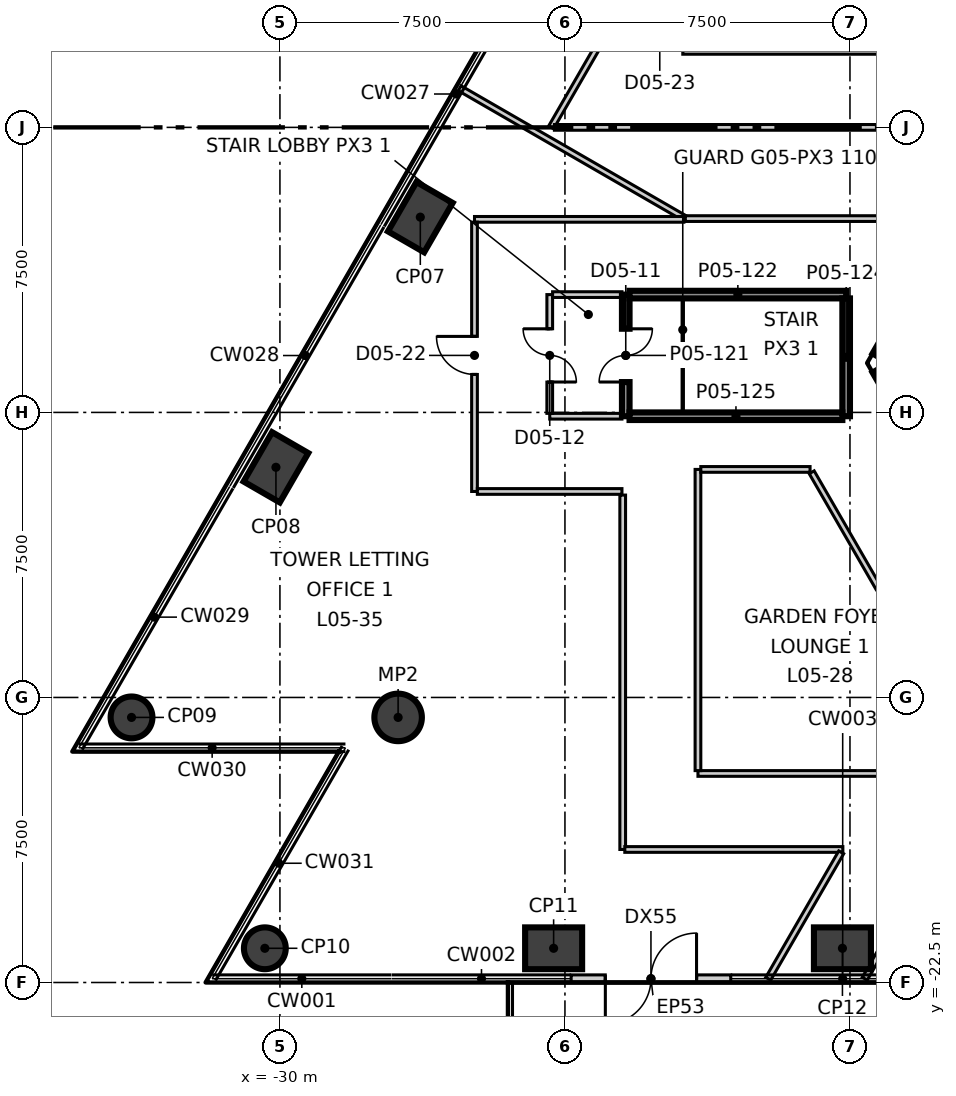
"""IFC4 building model, lengths in metres.
Left out: names, types, materials, properties, quantities, classifications, styles, units other than length and angle.
Written with IfcOpenShell. Run it as: python <this file> out.ifc"""

import sys

from ifc_helpers import new_model, si_unit, direction, frame, frame_2d, origin, origin_2d, place, context, subcontext, project, spatial, polyline, rectangle, circle, outline, extrude, element, fill, save


model = new_model("IFC4")
c1 = context("Model", 3, precision=1e-05, world=origin(), true_north=direction((0.0, 1.0)))
c2 = subcontext(c1, "Body", "Model", "MODEL_VIEW")
j1 = project(units=[si_unit("LENGTHUNIT", "METRE"), si_unit("PLANEANGLEUNIT", "RADIAN")], contexts=[c1])
p1 = place(None, origin())
s1 = spatial("IfcSite", under=j1, at=p1, CompositionType="ELEMENT")
p2 = place(p1, origin())
s2 = spatial("IfcBuilding", under=s1, at=p2, CompositionType="ELEMENT")
p3 = place(p2, frame((0.0, 0.0, 30.3)))
s3 = spatial("IfcBuildingStorey", under=s2, at=p3, CompositionType="ELEMENT", Elevation=30.3)
p4 = place(p3, frame((-1.617, 15.2, -0.4), z_axis=(0.0, 0.0, 1.0), x_axis=(-0.499992141631, -0.866029940768, 0.0)))
e1 = element("IfcWall", 1, at=p4, inside=s3, PredefinedType="SHEAR", context=c2, shape_type="SweptSolid", body=[
    extrude(outline(polyline([(-0.289, -0.499), (1.656, -0.499), (3.601, -0.499), (5.547, -0.499), (7.492, -0.499), (9.437, -0.5), (11.382, -0.5), (13.328, -0.5), (15.273, -0.5), (17.218, -0.5), (19.163, -0.5), (21.109, -0.5), (23.054, -0.5), (24.999, -0.5), (24.422, 0.5), (22.566, 0.5), (20.709, 0.5), (18.853, 0.5), (16.997, 0.5), (15.14, 0.5), (13.284, 0.5), (11.427, 0.5), (9.571, 0.5), (7.715, 0.5), (5.858, 0.5), (4.002, 0.5), (2.146, 0.5), (0.289, 0.5), (-0.289, -0.499)])), origin(), (0.0, 0.0, 1.0), 5.1),
])
p5 = place(p4, frame((11.805, 0.0, 0.4)))
e2 = element("IfcOpeningElement", 2, at=p5, cuts=e1, PredefinedType="OPENING", context=c2, shape_type="SweptSolid", body=[
    extrude(rectangle(XDim=1.1, YDim=2.1, at=frame_2d((0.55, 1.05))), frame((0.0, 0.51, 0.0), z_axis=(0.0, -1.0, 0.0), x_axis=(1.0, 0.0, 0.0)), (0.0, 0.0, 1.0), 1.02),
])
p6 = place(p3, frame((-13.972, -6.2, -0.4), z_axis=(0.0, 0.0, 1.0), x_axis=(0.500077567175, -0.865980615723, 0.0)))
e3 = element("IfcWall", 3, at=p6, inside=s3, PredefinedType="SHEAR", context=c2, shape_type="SweptSolid", body=[
    extrude(outline(polyline([(-0.289, -0.5), (1.616, -0.5), (3.522, -0.5), (2.944, 0.499), (1.617, 0.5), (0.289, 0.5), (-0.289, -0.5)])), origin(), (0.0, 0.0, 1.0), 5.1),
])
p7 = place(p6, frame((0.917, 0.0, 0.4)))
e4 = element("IfcOpeningElement", 4, at=p7, cuts=e3, PredefinedType="OPENING", context=c2, shape_type="SweptSolid", body=[
    extrude(rectangle(XDim=1.4, YDim=2.1, at=frame_2d((0.7, 1.05))), frame((0.0, 0.51, 0.0), z_axis=(0.0, -1.0, 0.0), x_axis=(1.0, 0.0, 0.0)), (0.0, 0.0, 1.0), 1.02),
])
for number, where, z_axis, x_axis in (
    (5, (-26.306, -2.362, -0.4), (0.0, 0.0, 1.0), (0.5, 0.866, 0.0)),
    (6, (-30.105, -8.944, -0.4), (0.0, 0.0, 1.0), (0.5, 0.866, 0.0)),
):
    element("IfcColumn", number, at=place(p3, frame(where, z_axis=z_axis, x_axis=x_axis)), inside=s3, PredefinedType="COLUMN", context=c2, shape_type="SweptSolid", body=[
        extrude(rectangle(XDim=1.5, YDim=1.1, at=origin_2d()), origin(), (0.0, 0.0, 1.0), 5.1),
    ])
for number, where, z_axis, x_axis in (
    (7, (-33.905, -15.525, -0.4), (0.0, 0.0, 1.0), (0.5, 0.866, 0.0)),
    (8, (-30.397, -21.6, -0.4), (0.0, 0.0, 1.0), (1.0, 0.0, 0.0)),
):
    element("IfcColumn", number, at=place(p3, frame(where, z_axis=z_axis, x_axis=x_axis)), inside=s3, PredefinedType="COLUMN", context=c2, shape_type="SweptSolid", body=[
        extrude(circle(Radius=0.55, at=origin_2d()), origin(), (0.0, 0.0, 1.0), 5.1),
    ])
for number, where, z_axis, x_axis in (
    (9, (-22.798, -21.6, -0.4), (0.0, 0.0, 1.0), (1.0, 0.0, 0.0)),
    (10, (-15.198, -21.6, -0.4), (0.0, 0.0, 1.0), (1.0, 0.0, 0.0)),
):
    element("IfcColumn", number, at=place(p3, frame(where, z_axis=z_axis, x_axis=x_axis)), inside=s3, PredefinedType="COLUMN", context=c2, shape_type="SweptSolid", body=[
        extrude(rectangle(XDim=1.5, YDim=1.1, at=origin_2d()), origin(), (0.0, 0.0, 1.0), 5.1),
    ])
p8 = place(p3, frame((-26.89, -15.525, -0.4), z_axis=(0.0, 0.0, 1.0), x_axis=(1.0, 0.0, 0.0)))
e11 = element("IfcColumn", 11, at=p8, inside=s3, PredefinedType="COLUMN", context=c2, shape_type="SweptSolid", body=[
    extrude(circle(Radius=0.625, at=origin_2d()), origin(), (0.0, 0.0, 1.0), 5.1),
])
p9 = place(p3, frame((-22.337, -22.4, 0.0), z_axis=(0.0, 0.0, 1.0), x_axis=(1.0, 0.0, 0.0)))
e12 = element("IfcWall", 12, at=p9, inside=s3, PredefinedType="ELEMENTEDWALL", context=c2, shape_type="SweptSolid", body=[
    extrude(rectangle(XDim=4.2, YDim=0.2, at=frame_2d((2.1, 0.0))), origin(), (0.0, 0.0, 1.0), 4.7),
])
p10 = place(p9, frame((0.9, 0.0, 0.0)))
e13 = element("IfcOpeningElement", 13, at=p10, cuts=e12, PredefinedType="OPENING", context=c2, shape_type="SweptSolid", body=[
    extrude(rectangle(XDim=2.4, YDim=2.4, at=frame_2d((1.2, 1.2))), frame((0.0, 0.11, 0.0), z_axis=(0.0, -1.0, 0.0), x_axis=(1.0, 0.0, 0.0)), (0.0, 0.0, 1.0), 0.22),
])
p11 = place(p3, frame((-22.9, -7.6, 0.0), z_axis=(0.0, 0.0, 1.0), x_axis=(1.0, 0.0, 0.0)))
e14 = element("IfcWall", 14, at=p11, inside=s3, PredefinedType="PARTITIONING", context=c2, shape_type="SweptSolid", body=[
    extrude(rectangle(XDim=1.9, YDim=0.15, at=frame_2d((0.95, 0.0))), origin(), (0.0, 0.0, 1.0), 4.7),
])
p12 = place(p3, frame((-22.9, -7.525, 0.0), z_axis=(0.0, 0.0, 1.0), x_axis=(0.0, 1.0, 0.0)))
e15 = element("IfcWall", 15, at=p12, inside=s3, PredefinedType="PARTITIONING", context=c2, shape_type="SweptSolid", body=[
    extrude(rectangle(XDim=3.125, YDim=0.15, at=frame_2d((1.562, 0.0))), origin(), (0.0, 0.0, 1.0), 4.7),
])
p13 = place(p12, frame((0.825, 0.0, 0.0)))
e16 = element("IfcOpeningElement", 16, at=p13, cuts=e15, PredefinedType="OPENING", context=c2, shape_type="SweptSolid", body=[
    extrude(rectangle(XDim=1.4, YDim=2.1, at=frame_2d((0.7, 1.05))), frame((0.0, 0.085, 0.0), z_axis=(0.0, -1.0, 0.0), x_axis=(1.0, 0.0, 0.0)), (0.0, 0.0, 1.0), 0.17),
])
p14 = place(p3, frame((-22.825, -4.4, 0.0), z_axis=(0.0, 0.0, 1.0), x_axis=(1.0, 0.0, 0.0)))
e17 = element("IfcWall", 17, at=p14, inside=s3, PredefinedType="PARTITIONING", context=c2, shape_type="SweptSolid", body=[
    extrude(rectangle(XDim=1.825, YDim=0.15, at=frame_2d((0.913, 0.0))), origin(), (0.0, 0.0, 1.0), 4.7),
])
p15 = place(p3, frame((-25.271, 1.03, 0.0), z_axis=(0.0, 0.0, 1.0), x_axis=(0.865997947348, -0.500047552927, 0.0)))
e18 = element("IfcWall", 18, at=p15, inside=s3, PredefinedType="PARTITIONING", context=c2, shape_type="SweptSolid", body=[
    extrude(rectangle(XDim=6.825, YDim=0.15, at=frame_2d((3.413, 0.0))), origin(), (0.0, 0.0, 1.0), 4.7),
])
p16 = place(p3, frame((-22.863, 0.0, 0.0), z_axis=(0.0, 0.0, 1.0), x_axis=(0.500027479704, 0.866009537788, 0.0)))
e19 = element("IfcWall", 19, at=p16, inside=s3, PredefinedType="PARTITIONING", context=c2, shape_type="SweptSolid", body=[
    extrude(rectangle(XDim=15.011, YDim=0.15, at=frame_2d((7.506, 0.0))), origin(), (0.0, 0.0, 1.0), 4.7),
])
p17 = place(p16, frame((5.216, 0.0, 0.0)))
e20 = element("IfcOpeningElement", 20, at=p17, cuts=e19, PredefinedType="OPENING", context=c2, shape_type="SweptSolid", body=[
    extrude(rectangle(XDim=1.0, YDim=2.1, at=frame_2d((0.5, 1.05))), frame((0.0, 0.085, 0.0), z_axis=(0.0, -1.0, 0.0), x_axis=(1.0, 0.0, 0.0)), (0.0, 0.0, 1.0), 0.17),
])
p18 = place(p3, frame((-22.777, 0.0, 0.0), z_axis=(0.0, 0.0, 1.0), x_axis=(1.0, 0.0, 0.0)))
e21 = element("IfcWall", 21, at=p18, inside=s3, PredefinedType="PARTITIONING", context=c2, shape_type="SweptSolid", body=[
    extrude(rectangle(XDim=10.075, YDim=0.15, at=frame_2d((5.038, 0.0))), origin(), (0.0, 0.0, 1.0), 4.7),
])
p19 = place(p3, frame((-19.333, -2.4, 0.0), z_axis=(0.0, 0.0, 1.0), x_axis=(1.0, 0.0, 0.0)))
e22 = element("IfcWall", 22, at=p19, inside=s3, PredefinedType="PARTITIONING", context=c2, shape_type="SweptSolid", body=[
    extrude(rectangle(XDim=5.159, YDim=0.15, at=frame_2d((2.58, 0.0))), origin(), (0.0, 0.0, 1.0), 4.7),
])
p20 = place(p3, frame((-24.88, -2.42, 0.0), z_axis=(0.0, 0.0, 1.0), x_axis=(1.0, 0.0, 0.0)))
e23 = element("IfcWall", 23, at=p20, inside=s3, PredefinedType="PARTITIONING", context=c2, shape_type="SweptSolid", body=[
    extrude(rectangle(XDim=5.51, YDim=0.15, at=frame_2d((2.755, 0.0))), origin(), (0.0, 0.0, 1.0), 4.1),
])
p21 = place(p3, frame((-24.88, -9.58, 0.0), z_axis=(0.0, 0.0, 1.0), x_axis=(0.0, 1.0, 0.0)))
e24 = element("IfcWall", 24, at=p21, inside=s3, PredefinedType="PARTITIONING", context=c2, shape_type="SweptSolid", body=[
    extrude(rectangle(XDim=7.085, YDim=0.15, at=frame_2d((3.542, 0.0))), origin(), (0.0, 0.0, 1.0), 4.7),
])
p22 = place(p21, frame((3.08, 0.0, 0.0)))
e25 = element("IfcOpeningElement", 25, at=p22, cuts=e24, PredefinedType="OPENING", context=c2, shape_type="SweptSolid", body=[
    extrude(rectangle(XDim=1.0, YDim=2.1, at=frame_2d((0.5, 1.05))), frame((0.0, 0.085, 0.0), z_axis=(0.0, -1.0, 0.0), x_axis=(1.0, 0.0, 0.0)), (0.0, 0.0, 1.0), 0.17),
])
p23 = place(p3, frame((-24.805, -9.58, 0.0), z_axis=(0.0, 0.0, 1.0), x_axis=(1.0, 0.0, 0.0)))
e26 = element("IfcWall", 26, at=p23, inside=s3, PredefinedType="PARTITIONING", context=c2, shape_type="SweptSolid", body=[
    extrude(rectangle(XDim=3.805, YDim=0.15, at=frame_2d((1.902, 0.0))), origin(), (0.0, 0.0, 1.0), 4.7),
])
p24 = place(p3, frame((-20.98, -19.0, 0.0), z_axis=(0.0, 0.0, 1.0), x_axis=(0.0, 1.0, 0.0)))
e27 = element("IfcWall", 27, at=p24, inside=s3, PredefinedType="PARTITIONING", context=c2, shape_type="SweptSolid", body=[
    extrude(rectangle(XDim=9.325, YDim=0.15, at=frame_2d((4.663, 0.0))), origin(), (0.0, 0.0, 1.0), 4.7),
])
p25 = place(p3, frame((-20.925, -19.0, 0.0), z_axis=(0.0, 0.0, 1.0), x_axis=(1.0, 0.0, 0.0)))
e28 = element("IfcWall", 28, at=p25, inside=s3, PredefinedType="PARTITIONING", context=c2, shape_type="SweptSolid", body=[
    extrude(rectangle(XDim=5.738, YDim=0.15, at=frame_2d((2.869, 0.0))), origin(), (0.0, 0.0, 1.0), 4.7),
])
p26 = place(p3, frame((-17.15, -22.4, 0.0), z_axis=(0.0, 0.0, 1.0), x_axis=(0.500050869834, 0.86599603208, 0.0)))
e29 = element("IfcWall", 29, at=p26, inside=s3, PredefinedType="PARTITIONING", context=c2, shape_type="SweptSolid", body=[
    extrude(rectangle(XDim=3.839, YDim=0.15, at=frame_2d((1.92, 0.0))), origin(), (0.0, 0.0, 1.0), 4.7),
])
p27 = place(p3, frame((-14.61, -22.4, 0.0), z_axis=(0.0, 0.0, 1.0), x_axis=(0.500098554833, 0.865968495648, 0.0)))
e30 = element("IfcWall", 30, at=p27, inside=s3, PredefinedType="PARTITIONING", context=c2, shape_type="SweptSolid", body=[
    extrude(rectangle(XDim=3.84, YDim=0.15, at=frame_2d((1.92, 0.0))), origin(), (0.0, 0.0, 1.0), 4.7),
])
p28 = place(p3, frame((-19.0, -17.0, 0.0), z_axis=(0.0, 0.0, 1.0), x_axis=(1.0, 0.0, 0.0)))
e31 = element("IfcWall", 31, at=p28, inside=s3, PredefinedType="PARTITIONING", context=c2, shape_type="SweptSolid", body=[
    extrude(rectangle(XDim=13.0, YDim=0.15, at=frame_2d((6.5, 0.0))), origin(), (0.0, 0.0, 1.0), 4.7),
])
p29 = place(p28, frame((5.6, 0.0, 0.0)))
e32 = element("IfcOpeningElement", 32, at=p29, cuts=e31, PredefinedType="OPENING", context=c2, shape_type="SweptSolid", body=[
    extrude(rectangle(XDim=1.8, YDim=2.1, at=frame_2d((0.9, 1.05))), frame((0.0, 0.085, 0.0), z_axis=(0.0, -1.0, 0.0), x_axis=(1.0, 0.0, 0.0)), (0.0, 0.0, 1.0), 0.17),
])
p30 = place(p3, frame((-19.399, 2.0, 0.0), z_axis=(0.0, 0.0, 1.0), x_axis=(1.0, 0.0, 0.0)))
e33 = element("IfcWall", 33, at=p30, inside=s3, PredefinedType="PARTITIONING", context=c2, shape_type="SweptSolid", body=[
    extrude(rectangle(XDim=6.38, YDim=0.15, at=frame_2d((3.19, 0.0))), origin(), (0.0, 0.0, 1.0), 4.7),
])
p31 = place(p3, frame((-19.0, -16.925, 0.0), z_axis=(0.0, 0.0, 1.0), x_axis=(0.0, 1.0, 0.0)))
e34 = element("IfcWall", 34, at=p31, inside=s3, PredefinedType="PARTITIONING", context=c2, shape_type="SweptSolid", body=[
    extrude(rectangle(XDim=7.925, YDim=0.15, at=frame_2d((3.962, 0.0))), origin(), (0.0, 0.0, 1.0), 4.7),
])
p32 = place(p3, frame((-18.925, -9.0, 0.0), z_axis=(0.0, 0.0, 1.0), x_axis=(1.0, 0.0, 0.0)))
e35 = element("IfcWall", 35, at=p32, inside=s3, PredefinedType="PARTITIONING", context=c2, shape_type="SweptSolid", body=[
    extrude(rectangle(XDim=2.875, YDim=0.15, at=frame_2d((1.438, 0.0))), origin(), (0.0, 0.0, 1.0), 4.7),
])
p33 = place(p3, frame((-16.007, -9.075, 0.0), z_axis=(0.0, 0.0, 1.0), x_axis=(0.500008478926, -0.866020508419, 0.0)))
e36 = element("IfcWall", 36, at=p33, inside=s3, PredefinedType="PARTITIONING", context=c2, shape_type="SweptSolid", body=[
    extrude(rectangle(XDim=3.522, YDim=0.15, at=frame_2d((1.761, 0.0))), origin(), (0.0, 0.0, 1.0), 4.7),
])
p34 = place(p3, frame((-20.9, -7.6, 0.0), z_axis=(0.0, 0.0, 1.0), x_axis=(0.0, 1.0, 0.0)))
e37 = element("IfcWall", 37, at=p34, inside=s3, PredefinedType="SOLIDWALL", context=c2, shape_type="SweptSolid", body=[
    extrude(rectangle(XDim=3.2, YDim=0.2, at=frame_2d((1.6, 0.0))), origin(), (0.0, 0.0, 1.0), 4.7),
])
p35 = place(p34, frame((0.9, 0.0, 0.0)))
e38 = element("IfcOpeningElement", 38, at=p35, cuts=e37, PredefinedType="OPENING", context=c2, shape_type="SweptSolid", body=[
    extrude(rectangle(XDim=1.4, YDim=2.1, at=frame_2d((0.7, 1.05))), frame((0.0, 0.11, 0.0), z_axis=(0.0, -1.0, 0.0), x_axis=(1.0, 0.0, 0.0)), (0.0, 0.0, 1.0), 0.22),
])
p36 = place(p3, frame((-20.8, -4.4, 0.0), z_axis=(0.0, 0.0, 1.0), x_axis=(1.0, 0.0, 0.0)))
e39 = element("IfcWall", 39, at=p36, inside=s3, PredefinedType="SOLIDWALL", context=c2, shape_type="SweptSolid", body=[
    extrude(rectangle(XDim=5.7, YDim=0.2, at=frame_2d((2.85, 0.0))), origin(), (0.0, 0.0, 1.0), 4.7),
])
p37 = place(p3, frame((-15.1, -7.6, 0.0), z_axis=(0.0, 0.0, 1.0), x_axis=(0.0, 1.0, 0.0)))
e40 = element("IfcWall", 40, at=p37, inside=s3, PredefinedType="SOLIDWALL", context=c2, shape_type="SweptSolid", body=[
    extrude(rectangle(XDim=3.1, YDim=0.2, at=frame_2d((1.55, 0.0))), origin(), (0.0, 0.0, 1.0), 4.7),
])
p38 = place(p3, frame((-20.8, -7.6, 0.0), z_axis=(0.0, 0.0, 1.0), x_axis=(1.0, 0.0, 0.0)))
e41 = element("IfcWall", 41, at=p38, inside=s3, PredefinedType="SOLIDWALL", context=c2, shape_type="SweptSolid", body=[
    extrude(rectangle(XDim=5.6, YDim=0.2, at=frame_2d((2.8, 0.0))), origin(), (0.0, 0.0, 1.0), 4.7),
])
p39 = place(p10, frame((2.4, 0.0, 0.0), z_axis=(0.0, 0.0, 1.0), x_axis=(-1.0, 0.0, 0.0)))
e42 = element("IfcDoor", 42, at=p39, inside=s3, OperationType="DOUBLE_DOOR_SINGLE_SWING", PredefinedType="DOOR", context=c2, shape_type="SweptSolid", body=[
    extrude(rectangle(XDim=2.4, YDim=2.4, at=frame_2d((1.2, 1.2))), frame((0.0, 0.025, 0.0), z_axis=(0.0, -1.0, 0.0), x_axis=(1.0, 0.0, 0.0)), (0.0, 0.0, 1.0), 0.05),
])
fill(e13, e42)
p40 = place(p35, origin())
e43 = element("IfcDoor", 43, at=p40, inside=s3, OperationType="DOUBLE_DOOR_SINGLE_SWING", PredefinedType="DOOR", context=c2, shape_type="SweptSolid", body=[
    extrude(rectangle(XDim=1.4, YDim=2.1, at=frame_2d((0.7, 1.05))), frame((0.0, 0.025, 0.0), z_axis=(0.0, -1.0, 0.0), x_axis=(1.0, 0.0, 0.0)), (0.0, 0.0, 1.0), 0.05),
])
fill(e38, e43)
p41 = place(p13, origin())
e44 = element("IfcDoor", 44, at=p41, inside=s3, OperationType="DOUBLE_DOOR_SINGLE_SWING", PredefinedType="DOOR", context=c2, shape_type="SweptSolid", body=[
    extrude(rectangle(XDim=1.4, YDim=2.1, at=frame_2d((0.7, 1.05))), frame((0.0, 0.025, 0.0), z_axis=(0.0, -1.0, 0.0), x_axis=(1.0, 0.0, 0.0)), (0.0, 0.0, 1.0), 0.05),
])
fill(e16, e44)
p42 = place(p22, origin())
e45 = element("IfcDoor", 45, at=p42, inside=s3, OperationType="SINGLE_SWING_LEFT", PredefinedType="DOOR", context=c2, shape_type="SweptSolid", body=[
    extrude(rectangle(XDim=1.0, YDim=2.1, at=frame_2d((0.5, 1.05))), frame((0.0, 0.025, 0.0), z_axis=(0.0, -1.0, 0.0), x_axis=(1.0, 0.0, 0.0)), (0.0, 0.0, 1.0), 0.05),
])
fill(e25, e45)
save(model, sys.argv[1])
